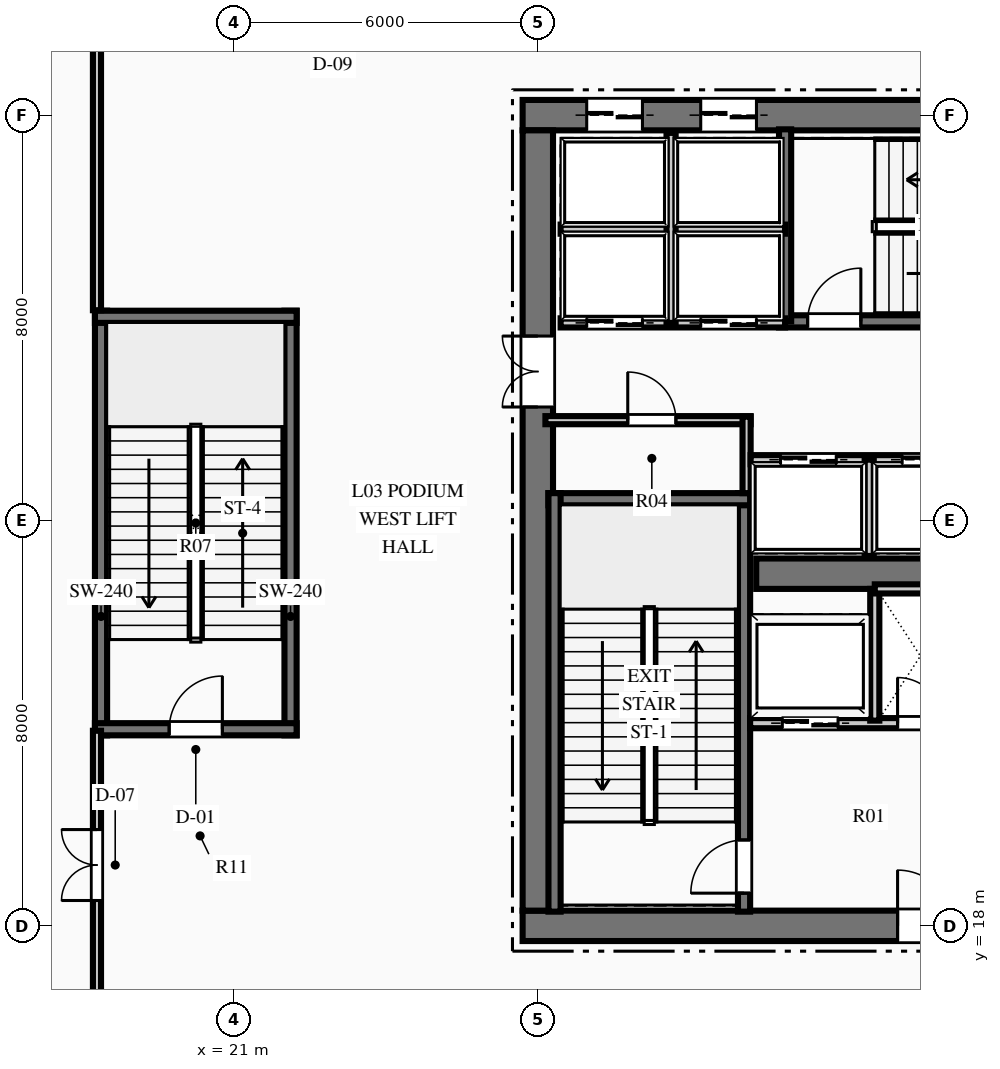
"""IFC4 building model, lengths in metres.
Left out: names, types, materials, properties, quantities, classifications, styles, units other than length and angle.
Written with IfcOpenShell. Run it as: python <this file> out.ifc"""

import sys

from ifc_helpers import new_model, si_unit, direction, frame, frame_2d, origin, place, context, subcontext, project, spatial, rectangle, extrude, element, fill, save


model = new_model("IFC4")
c1 = context("Model", 3, precision=1e-05, world=origin(), true_north=direction((0.0, 1.0)))
c2 = subcontext(c1, "Body", "Model", "MODEL_VIEW")
j1 = project(units=[si_unit("LENGTHUNIT", "METRE"), si_unit("PLANEANGLEUNIT", "RADIAN")], contexts=[c1])
p1 = place(None, origin())
s1 = spatial("IfcSite", under=j1, at=p1, CompositionType="ELEMENT")
p2 = place(p1, origin())
s2 = spatial("IfcBuilding", under=s1, at=p2, CompositionType="ELEMENT")
p3 = place(p2, frame((0.0, 0.0, 16.8)))
s3 = spatial("IfcBuildingStorey", under=s2, at=p3, CompositionType="ELEMENT", Elevation=16.8)
p4 = place(p3, frame((26.7, 18.0, 0.0), z_axis=(0.0, 0.0, 1.0), x_axis=(1.0, 0.0, 0.0)))
e1 = element("IfcWall", 1, at=p4, inside=s3, PredefinedType="SHEAR", context=c2, shape_type="SweptSolid", body=[
    extrude(rectangle(XDim=18.6, YDim=0.6, at=frame_2d((9.3, 0.0))), origin(), (0.0, 0.0, 1.0), 5.4),
])
p5 = place(p4, frame((7.4, 0.0, 0.0)))
e2 = element("IfcOpeningElement", 2, at=p5, cuts=e1, PredefinedType="OPENING", context=c2, shape_type="SweptSolid", body=[
    extrude(rectangle(XDim=1.1, YDim=2.15, at=frame_2d((0.55, 1.075))), frame((0.0, 0.31, 0.0), z_axis=(0.0, -1.0, 0.0), x_axis=(1.0, 0.0, 0.0)), (0.0, 0.0, 1.0), 0.62),
])
p6 = place(p4, frame((10.1, 0.0, 0.0)))
e3 = element("IfcOpeningElement", 3, at=p6, cuts=e1, PredefinedType="OPENING", context=c2, shape_type="SweptSolid", body=[
    extrude(rectangle(XDim=1.1, YDim=2.15, at=frame_2d((0.55, 1.075))), frame((0.0, 0.31, 0.0), z_axis=(0.0, -1.0, 0.0), x_axis=(1.0, 0.0, 0.0)), (0.0, 0.0, 1.0), 0.62),
])
p7 = place(p3, frame((26.7, 34.0, 0.0), z_axis=(0.0, 0.0, 1.0), x_axis=(1.0, 0.0, 0.0)))
e4 = element("IfcWall", 4, at=p7, inside=s3, PredefinedType="SHEAR", context=c2, shape_type="SweptSolid", body=[
    extrude(rectangle(XDim=18.6, YDim=0.6, at=frame_2d((9.3, 0.0))), origin(), (0.0, 0.0, 1.0), 5.4),
])
p8 = place(p7, frame((1.265, 0.0, 0.0)))
e5 = element("IfcOpeningElement", 5, at=p8, cuts=e4, PredefinedType="OPENING", context=c2, shape_type="SweptSolid", body=[
    extrude(rectangle(XDim=1.1, YDim=2.15, at=frame_2d((0.55, 1.075))), frame((0.0, 0.31, 0.0), z_axis=(0.0, -1.0, 0.0), x_axis=(1.0, 0.0, 0.0)), (0.0, 0.0, 1.0), 0.62),
])
p9 = place(p7, frame((3.515, 0.0, 0.0)))
e6 = element("IfcOpeningElement", 6, at=p9, cuts=e4, PredefinedType="OPENING", context=c2, shape_type="SweptSolid", body=[
    extrude(rectangle(XDim=1.1, YDim=2.15, at=frame_2d((0.55, 1.075))), frame((0.0, 0.31, 0.0), z_axis=(0.0, -1.0, 0.0), x_axis=(1.0, 0.0, 0.0)), (0.0, 0.0, 1.0), 0.62),
])
p10 = place(p7, frame((13.985, 0.0, 0.0)))
e7 = element("IfcOpeningElement", 7, at=p10, cuts=e4, PredefinedType="OPENING", context=c2, shape_type="SweptSolid", body=[
    extrude(rectangle(XDim=1.1, YDim=2.15, at=frame_2d((0.55, 1.075))), frame((0.0, 0.31, 0.0), z_axis=(0.0, -1.0, 0.0), x_axis=(1.0, 0.0, 0.0)), (0.0, 0.0, 1.0), 0.62),
])
p11 = place(p7, frame((16.235, 0.0, 0.0)))
e8 = element("IfcOpeningElement", 8, at=p11, cuts=e4, PredefinedType="OPENING", context=c2, shape_type="SweptSolid", body=[
    extrude(rectangle(XDim=1.1, YDim=2.15, at=frame_2d((0.55, 1.075))), frame((0.0, 0.31, 0.0), z_axis=(0.0, -1.0, 0.0), x_axis=(1.0, 0.0, 0.0)), (0.0, 0.0, 1.0), 0.62),
])
p12 = place(p3, frame((27.0, 18.3, 0.0), z_axis=(0.0, 0.0, 1.0), x_axis=(0.0, 1.0, 0.0)))
e9 = element("IfcWall", 9, at=p12, inside=s3, PredefinedType="SHEAR", context=c2, shape_type="SweptSolid", body=[
    extrude(rectangle(XDim=15.4, YDim=0.6, at=frame_2d((7.7, 0.0))), origin(), (0.0, 0.0, 1.0), 5.4),
])
p13 = place(p12, frame((9.94, 0.0, 0.0)))
e10 = element("IfcOpeningElement", 10, at=p13, cuts=e9, PredefinedType="OPENING", context=c2, shape_type="SweptSolid", body=[
    extrude(rectangle(XDim=1.4, YDim=2.2, at=frame_2d((0.7, 1.1))), frame((0.0, 0.31, 0.0), z_axis=(0.0, -1.0, 0.0), x_axis=(1.0, 0.0, 0.0)), (0.0, 0.0, 1.0), 0.62),
])
p14 = place(p3, frame((31.31, 24.95, 0.0), z_axis=(0.0, 0.0, 1.0), x_axis=(1.0, 0.0, 0.0)))
e11 = element("IfcWall", 11, at=p14, inside=s3, PredefinedType="SHEAR", context=c2, shape_type="SweptSolid", body=[
    extrude(rectangle(XDim=9.38, YDim=0.6, at=frame_2d((4.69, 0.0))), origin(), (0.0, 0.0, 1.0), 5.4),
])
p15 = place(p3, frame((31.07, 18.28, 0.0), z_axis=(0.0, 0.0, 1.0), x_axis=(0.0, 1.0, 0.0)))
e12 = element("IfcWall", 12, at=p15, inside=s3, PredefinedType="SHEAR", context=c2, shape_type="SweptSolid", body=[
    extrude(rectangle(XDim=8.26, YDim=0.24, at=frame_2d((4.13, 0.0))), origin(), (0.0, 0.0, 1.0), 5.4),
])
p16 = place(p15, frame((0.365, 0.0, 0.0)))
e13 = element("IfcOpeningElement", 13, at=p16, cuts=e12, PredefinedType="OPENING", context=c2, shape_type="SweptSolid", body=[
    extrude(rectangle(XDim=1.05, YDim=2.15, at=frame_2d((0.525, 1.075))), frame((0.0, 0.13, 0.0), z_axis=(0.0, -1.0, 0.0), x_axis=(1.0, 0.0, 0.0)), (0.0, 0.0, 1.0), 0.26),
])
p17 = place(p3, frame((27.21, 26.42, 0.0), z_axis=(0.0, 0.0, 1.0), x_axis=(1.0, 0.0, 0.0)))
e14 = element("IfcWall", 14, at=p17, inside=s3, PredefinedType="SHEAR", context=c2, shape_type="SweptSolid", body=[
    extrude(rectangle(XDim=3.98, YDim=0.24, at=frame_2d((1.99, 0.0))), origin(), (0.0, 0.0, 1.0), 5.4),
])
p18 = place(p3, frame((27.33, 18.28, 0.0), z_axis=(0.0, 0.0, 1.0), x_axis=(0.0, 1.0, 0.0)))
e15 = element("IfcWall", 15, at=p18, inside=s3, PredefinedType="SHEAR", context=c2, shape_type="SweptSolid", body=[
    extrude(rectangle(XDim=8.26, YDim=0.24, at=frame_2d((4.13, 0.0))), origin(), (0.0, 0.0, 1.0), 5.4),
])
p19 = place(p3, frame((31.76, 29.93, 0.0), z_axis=(0.0, 0.0, 1.0), x_axis=(1.0, 0.0, 0.0)))
e16 = element("IfcWall", 16, at=p19, inside=s3, PredefinedType="SHEAR", context=c2, shape_type="SweptSolid", body=[
    extrude(rectangle(XDim=8.38, YDim=0.24, at=frame_2d((4.19, 0.0))), origin(), (0.0, 0.0, 1.0), 5.4),
])
p20 = place(p19, frame((0.565, 0.0, 0.0)))
e17 = element("IfcOpeningElement", 17, at=p20, cuts=e16, PredefinedType="OPENING", context=c2, shape_type="SweptSolid", body=[
    extrude(rectangle(XDim=1.05, YDim=2.15, at=frame_2d((0.525, 1.075))), frame((0.0, 0.13, 0.0), z_axis=(0.0, -1.0, 0.0), x_axis=(1.0, 0.0, 0.0)), (0.0, 0.0, 1.0), 0.26),
])
p21 = place(p3, frame((31.88, 29.93, 0.0), z_axis=(0.0, 0.0, 1.0), x_axis=(0.0, 1.0, 0.0)))
e18 = element("IfcWall", 18, at=p21, inside=s3, PredefinedType="SHEAR", context=c2, shape_type="SweptSolid", body=[
    extrude(rectangle(XDim=3.79, YDim=0.24, at=frame_2d((1.895, 0.0))), origin(), (0.0, 0.0, 1.0), 5.4),
])
for number, where, z_axis, x_axis in (
    (19, (18.38, 21.76, 0.0), (0.0, 0.0, 1.0), (0.0, 1.0, 0.0)),
    (20, (22.12, 21.76, 0.0), (0.0, 0.0, 1.0), (0.0, 1.0, 0.0)),
):
    element("IfcWall", number, at=place(p3, frame(where, z_axis=z_axis, x_axis=x_axis)), inside=s3, PredefinedType="SHEAR", context=c2, shape_type="SweptSolid", body=[
        extrude(rectangle(XDim=8.38, YDim=0.24, at=frame_2d((4.19, 0.0))), origin(), (0.0, 0.0, 1.0), 5.4),
    ])
p22 = place(p3, frame((18.26, 21.88, 0.0), z_axis=(0.0, 0.0, 1.0), x_axis=(1.0, 0.0, 0.0)))
e21 = element("IfcWall", 21, at=p22, inside=s3, PredefinedType="SHEAR", context=c2, shape_type="SweptSolid", body=[
    extrude(rectangle(XDim=3.98, YDim=0.24, at=frame_2d((1.99, 0.0))), origin(), (0.0, 0.0, 1.0), 5.4),
])
p23 = place(p22, frame((1.465, 0.0, 0.0)))
e22 = element("IfcOpeningElement", 22, at=p23, cuts=e21, PredefinedType="OPENING", context=c2, shape_type="SweptSolid", body=[
    extrude(rectangle(XDim=1.05, YDim=2.15, at=frame_2d((0.525, 1.075))), frame((0.0, 0.13, 0.0), z_axis=(0.0, -1.0, 0.0), x_axis=(1.0, 0.0, 0.0)), (0.0, 0.0, 1.0), 0.26),
])
p24 = place(p3, frame((18.26, 30.02, 0.0), z_axis=(0.0, 0.0, 1.0), x_axis=(1.0, 0.0, 0.0)))
e23 = element("IfcWall", 23, at=p24, inside=s3, PredefinedType="SHEAR", context=c2, shape_type="SweptSolid", body=[
    extrude(rectangle(XDim=3.98, YDim=0.24, at=frame_2d((1.99, 0.0))), origin(), (0.0, 0.0, 1.0), 5.4),
])
p25 = place(p3, frame((31.19, 22.0, 0.0), z_axis=(0.0, 0.0, 1.0), x_axis=(1.0, 0.0, 0.0)))
e24 = element("IfcWall", 24, at=p25, inside=s3, PredefinedType="PARTITIONING", context=c2, shape_type="SweptSolid", body=[
    extrude(rectangle(XDim=4.69, YDim=0.2, at=frame_2d((2.345, 0.0))), origin(), (0.0, 0.0, 1.0), 4.98),
])
p26 = place(p25, frame((2.91, 0.0, 0.0)))
e25 = element("IfcOpeningElement", 25, at=p26, cuts=e24, PredefinedType="OPENING", context=c2, shape_type="SweptSolid", body=[
    extrude(rectangle(XDim=0.9, YDim=2.15, at=frame_2d((0.45, 1.075))), frame((0.0, 0.11, 0.0), z_axis=(0.0, -1.0, 0.0), x_axis=(1.0, 0.0, 0.0)), (0.0, 0.0, 1.0), 0.22),
])
p27 = place(p25, frame((0.635, 0.0, 0.0)))
e26 = element("IfcOpeningElement", 26, at=p27, cuts=e24, PredefinedType="OPENING", context=c2, shape_type="SweptSolid", body=[
    extrude(rectangle(XDim=1.1, YDim=2.15, at=frame_2d((0.55, 1.075))), frame((0.0, 0.11, 0.0), z_axis=(0.0, -1.0, 0.0), x_axis=(1.0, 0.0, 0.0)), (0.0, 0.0, 1.0), 0.22),
])
p28 = place(p3, frame((33.65, 22.05, 0.0), z_axis=(0.0, 0.0, 1.0), x_axis=(0.0, 1.0, 0.0)))
e27 = element("IfcWall", 27, at=p28, inside=s3, PredefinedType="PARTITIONING", context=c2, shape_type="SweptSolid", body=[
    extrude(rectangle(XDim=2.6, YDim=0.18, at=frame_2d((1.3, 0.0))), origin(), (0.0, 0.0, 1.0), 4.98),
])
p29 = place(p3, frame((33.65, 24.65, 0.0), z_axis=(0.0, 0.0, 1.0), x_axis=(1.0, 0.0, 0.0)))
e28 = element("IfcWall", 28, at=p29, inside=s3, PredefinedType="PARTITIONING", context=c2, shape_type="SweptSolid", body=[
    extrude(rectangle(XDim=1.8, YDim=0.18, at=frame_2d((0.9, 0.0))), origin(), (0.0, 0.0, 1.0), 4.98),
])
p30 = place(p3, frame((27.15, 27.98, 0.0), z_axis=(0.0, 0.0, 1.0), x_axis=(1.0, 0.0, 0.0)))
e29 = element("IfcWall", 29, at=p30, inside=s3, PredefinedType="PARTITIONING", context=c2, shape_type="SweptSolid", body=[
    extrude(rectangle(XDim=4.05, YDim=0.16, at=frame_2d((2.025, 0.0))), origin(), (0.0, 0.0, 1.0), 4.98),
])
p31 = place(p30, frame((1.625, 0.0, 0.0)))
e30 = element("IfcOpeningElement", 30, at=p31, cuts=e29, PredefinedType="OPENING", context=c2, shape_type="SweptSolid", body=[
    extrude(rectangle(XDim=0.95, YDim=2.15, at=frame_2d((0.475, 1.075))), frame((0.0, 0.09, 0.0), z_axis=(0.0, -1.0, 0.0), x_axis=(1.0, 0.0, 0.0)), (0.0, 0.0, 1.0), 0.18),
])
p32 = place(p3, frame((31.12, 26.54, 0.0), z_axis=(0.0, 0.0, 1.0), x_axis=(0.0, 1.0, 0.0)))
e31 = element("IfcWall", 31, at=p32, inside=s3, PredefinedType="PARTITIONING", context=c2, shape_type="SweptSolid", body=[
    extrude(rectangle(XDim=1.51, YDim=0.16, at=frame_2d((0.755, 0.0))), origin(), (0.0, 0.0, 1.0), 4.98),
])
p33 = place(p3, frame((27.45, 29.9, 0.0), z_axis=(0.0, 0.0, 1.0), x_axis=(1.0, 0.0, 0.0)))
e32 = element("IfcWall", 32, at=p33, inside=s3, PredefinedType="PARTITIONING", context=c2, shape_type="SweptSolid", body=[
    extrude(rectangle(XDim=4.43, YDim=0.18, at=frame_2d((2.215, 0.0))), origin(), (0.0, 0.0, 1.0), 4.98),
])
p34 = place(p33, frame((0.515, 0.0, 0.0)))
e33 = element("IfcOpeningElement", 33, at=p34, cuts=e32, PredefinedType="OPENING", context=c2, shape_type="SweptSolid", body=[
    extrude(rectangle(XDim=1.1, YDim=2.15, at=frame_2d((0.55, 1.075))), frame((0.0, 0.1, 0.0), z_axis=(0.0, -1.0, 0.0), x_axis=(1.0, 0.0, 0.0)), (0.0, 0.0, 1.0), 0.2),
])
p35 = place(p33, frame((2.765, 0.0, 0.0)))
e34 = element("IfcOpeningElement", 34, at=p35, cuts=e32, PredefinedType="OPENING", context=c2, shape_type="SweptSolid", body=[
    extrude(rectangle(XDim=1.1, YDim=2.15, at=frame_2d((0.55, 1.075))), frame((0.0, 0.1, 0.0), z_axis=(0.0, -1.0, 0.0), x_axis=(1.0, 0.0, 0.0)), (0.0, 0.0, 1.0), 0.2),
])
p36 = place(p3, frame((27.45, 31.75, 0.0), z_axis=(0.0, 0.0, 1.0), x_axis=(1.0, 0.0, 0.0)))
e35 = element("IfcWall", 35, at=p36, inside=s3, PredefinedType="PARTITIONING", context=c2, shape_type="SweptSolid", body=[
    extrude(rectangle(XDim=4.43, YDim=0.18, at=frame_2d((2.215, 0.0))), origin(), (0.0, 0.0, 1.0), 4.98),
])
p37 = place(p3, frame((29.63, 29.9, 0.0), z_axis=(0.0, 0.0, 1.0), x_axis=(0.0, 1.0, 0.0)))
e36 = element("IfcWall", 36, at=p37, inside=s3, PredefinedType="PARTITIONING", context=c2, shape_type="SweptSolid", body=[
    extrude(rectangle(XDim=3.75, YDim=0.18, at=frame_2d((1.875, 0.0))), origin(), (0.0, 0.0, 1.0), 4.98),
])
p38 = place(p3, frame((31.2, 27.2, 0.0), z_axis=(0.0, 0.0, 1.0), x_axis=(1.0, 0.0, 0.0)))
e37 = element("IfcWall", 37, at=p38, inside=s3, PredefinedType="PARTITIONING", context=c2, shape_type="SweptSolid", body=[
    extrude(rectangle(XDim=9.6, YDim=0.18, at=frame_2d((4.8, 0.0))), origin(), (0.0, 0.0, 1.0), 4.98),
])
p39 = place(p38, frame((0.59, 0.0, 0.0)))
e38 = element("IfcOpeningElement", 38, at=p39, cuts=e37, PredefinedType="OPENING", context=c2, shape_type="SweptSolid", body=[
    extrude(rectangle(XDim=1.1, YDim=2.15, at=frame_2d((0.55, 1.075))), frame((0.0, 0.1, 0.0), z_axis=(0.0, -1.0, 0.0), x_axis=(1.0, 0.0, 0.0)), (0.0, 0.0, 1.0), 0.2),
])
p40 = place(p38, frame((2.99, 0.0, 0.0)))
e39 = element("IfcOpeningElement", 39, at=p40, cuts=e37, PredefinedType="OPENING", context=c2, shape_type="SweptSolid", body=[
    extrude(rectangle(XDim=1.1, YDim=2.15, at=frame_2d((0.55, 1.075))), frame((0.0, 0.1, 0.0), z_axis=(0.0, -1.0, 0.0), x_axis=(1.0, 0.0, 0.0)), (0.0, 0.0, 1.0), 0.2),
])
p41 = place(p38, frame((5.51, 0.0, 0.0)))
e40 = element("IfcOpeningElement", 40, at=p41, cuts=e37, PredefinedType="OPENING", context=c2, shape_type="SweptSolid", body=[
    extrude(rectangle(XDim=1.1, YDim=2.15, at=frame_2d((0.55, 1.075))), frame((0.0, 0.1, 0.0), z_axis=(0.0, -1.0, 0.0), x_axis=(1.0, 0.0, 0.0)), (0.0, 0.0, 1.0), 0.2),
])
p42 = place(p38, frame((7.91, 0.0, 0.0)))
e41 = element("IfcOpeningElement", 41, at=p42, cuts=e37, PredefinedType="OPENING", context=c2, shape_type="SweptSolid", body=[
    extrude(rectangle(XDim=1.1, YDim=2.15, at=frame_2d((0.55, 1.075))), frame((0.0, 0.1, 0.0), z_axis=(0.0, -1.0, 0.0), x_axis=(1.0, 0.0, 0.0)), (0.0, 0.0, 1.0), 0.2),
])
p43 = place(p3, frame((33.54, 25.3, 0.0), z_axis=(0.0, 0.0, 1.0), x_axis=(0.0, 1.0, 0.0)))
e42 = element("IfcWall", 42, at=p43, inside=s3, PredefinedType="PARTITIONING", context=c2, shape_type="SweptSolid", body=[
    extrude(rectangle(XDim=1.9, YDim=0.18, at=frame_2d((0.95, 0.0))), origin(), (0.0, 0.0, 1.0), 4.98),
])
p44 = place(p3, frame((18.3, 15.3, 0.0), z_axis=(0.0, 0.0, 1.0), x_axis=(0.0, 1.0, 0.0)))
e43 = element("IfcWall", 43, at=p44, inside=s3, PredefinedType="PARTITIONING", context=c2, shape_type="SweptSolid", body=[
    extrude(rectangle(XDim=6.55, YDim=0.16, at=frame_2d((3.275, 0.0))), origin(), (0.0, 0.0, 1.0), 4.98),
])
p45 = place(p44, frame((3.2, 0.0, 0.0)))
e44 = element("IfcOpeningElement", 44, at=p45, cuts=e43, PredefinedType="OPENING", context=c2, shape_type="SweptSolid", body=[
    extrude(rectangle(XDim=1.4, YDim=2.2, at=frame_2d((0.7, 1.1))), frame((0.0, 0.09, 0.0), z_axis=(0.0, -1.0, 0.0), x_axis=(1.0, 0.0, 0.0)), (0.0, 0.0, 1.0), 0.18),
])
p46 = place(p3, frame((18.3, 30.15, 0.0), z_axis=(0.0, 0.0, 1.0), x_axis=(0.0, 1.0, 0.0)))
e45 = element("IfcWall", 45, at=p46, inside=s3, PredefinedType="PARTITIONING", context=c2, shape_type="SweptSolid", body=[
    extrude(rectangle(XDim=6.55, YDim=0.16, at=frame_2d((3.275, 0.0))), origin(), (0.0, 0.0, 1.0), 4.98),
])
p47 = place(p31, origin())
e46 = element("IfcDoor", 46, at=p47, inside=s3, OperationType="SINGLE_SWING_LEFT", PredefinedType="DOOR", context=c2, shape_type="SweptSolid", body=[
    extrude(rectangle(XDim=0.95, YDim=2.15, at=frame_2d((0.475, 1.075))), frame((0.0, 0.025, 0.0), z_axis=(0.0, -1.0, 0.0), x_axis=(1.0, 0.0, 0.0)), (0.0, 0.0, 1.0), 0.05),
])
fill(e30, e46)
p48 = place(p16, origin())
e47 = element("IfcDoor", 47, at=p48, inside=s3, OperationType="SINGLE_SWING_LEFT", PredefinedType="DOOR", context=c2, shape_type="SweptSolid", body=[
    extrude(rectangle(XDim=1.05, YDim=2.15, at=frame_2d((0.525, 1.075))), frame((0.0, 0.025, 0.0), z_axis=(0.0, -1.0, 0.0), x_axis=(1.0, 0.0, 0.0)), (0.0, 0.0, 1.0), 0.05),
])
fill(e13, e47)
p49 = place(p20, origin())
e48 = element("IfcDoor", 48, at=p49, inside=s3, OperationType="SINGLE_SWING_RIGHT", PredefinedType="DOOR", context=c2, shape_type="SweptSolid", body=[
    extrude(rectangle(XDim=1.05, YDim=2.15, at=frame_2d((0.525, 1.075))), frame((0.0, 0.025, 0.0), z_axis=(0.0, -1.0, 0.0), x_axis=(1.0, 0.0, 0.0)), (0.0, 0.0, 1.0), 0.05),
])
fill(e17, e48)
p50 = place(p5, origin())
e49 = element("IfcDoor", 49, at=p50, inside=s3, OperationType="SINGLE_SWING_LEFT", PredefinedType="DOOR", context=c2, shape_type="SweptSolid", body=[
    extrude(rectangle(XDim=1.1, YDim=2.15, at=frame_2d((0.55, 1.075))), frame((0.0, 0.025, 0.0), z_axis=(0.0, -1.0, 0.0), x_axis=(1.0, 0.0, 0.0)), (0.0, 0.0, 1.0), 0.05),
])
fill(e2, e49)
p51 = place(p26, origin())
e50 = element("IfcDoor", 50, at=p51, inside=s3, OperationType="SINGLE_SWING_LEFT", PredefinedType="DOOR", context=c2, shape_type="SweptSolid", body=[
    extrude(rectangle(XDim=0.9, YDim=2.15, at=frame_2d((0.45, 1.075))), frame((0.0, 0.025, 0.0), z_axis=(0.0, -1.0, 0.0), x_axis=(1.0, 0.0, 0.0)), (0.0, 0.0, 1.0), 0.05),
])
fill(e25, e50)
p52 = place(p13, origin())
e51 = element("IfcDoor", 51, at=p52, inside=s3, OperationType="DOUBLE_DOOR_SINGLE_SWING", PredefinedType="DOOR", context=c2, shape_type="SweptSolid", body=[
    extrude(rectangle(XDim=1.4, YDim=2.2, at=frame_2d((0.7, 1.1))), frame((0.0, 0.025, 0.0), z_axis=(0.0, -1.0, 0.0), x_axis=(1.0, 0.0, 0.0)), (0.0, 0.0, 1.0), 0.05),
])
fill(e10, e51)
p53 = place(p23, origin())
e52 = element("IfcDoor", 52, at=p53, inside=s3, OperationType="SINGLE_SWING_RIGHT", PredefinedType="DOOR", context=c2, shape_type="SweptSolid", body=[
    extrude(rectangle(XDim=1.05, YDim=2.15, at=frame_2d((0.525, 1.075))), frame((0.0, 0.025, 0.0), z_axis=(0.0, -1.0, 0.0), x_axis=(1.0, 0.0, 0.0)), (0.0, 0.0, 1.0), 0.05),
])
fill(e22, e52)
p54 = place(p45, origin())
e53 = element("IfcDoor", 53, at=p54, inside=s3, OperationType="DOUBLE_DOOR_SINGLE_SWING", PredefinedType="DOOR", context=c2, shape_type="SweptSolid", body=[
    extrude(rectangle(XDim=1.4, YDim=2.2, at=frame_2d((0.7, 1.1))), frame((0.0, 0.025, 0.0), z_axis=(0.0, -1.0, 0.0), x_axis=(1.0, 0.0, 0.0)), (0.0, 0.0, 1.0), 0.05),
])
fill(e44, e53)
p55 = place(p34, origin())
e54 = element("IfcDoor", 54, at=p55, inside=s3, OperationType="SLIDING_TO_LEFT", PredefinedType="DOOR", context=c2, shape_type="SweptSolid", body=[
    extrude(rectangle(XDim=1.1, YDim=2.15, at=frame_2d((0.55, 1.075))), frame((0.0, 0.025, 0.0), z_axis=(0.0, -1.0, 0.0), x_axis=(1.0, 0.0, 0.0)), (0.0, 0.0, 1.0), 0.05),
])
fill(e33, e54)
p56 = place(p35, origin())
e55 = element("IfcDoor", 55, at=p56, inside=s3, OperationType="SLIDING_TO_LEFT", PredefinedType="DOOR", context=c2, shape_type="SweptSolid", body=[
    extrude(rectangle(XDim=1.1, YDim=2.15, at=frame_2d((0.55, 1.075))), frame((0.0, 0.025, 0.0), z_axis=(0.0, -1.0, 0.0), x_axis=(1.0, 0.0, 0.0)), (0.0, 0.0, 1.0), 0.05),
])
fill(e34, e55)
p57 = place(p8, origin())
e56 = element("IfcDoor", 56, at=p57, inside=s3, OperationType="SLIDING_TO_LEFT", PredefinedType="DOOR", context=c2, shape_type="SweptSolid", body=[
    extrude(rectangle(XDim=1.1, YDim=2.15, at=frame_2d((0.55, 1.075))), frame((0.0, 0.025, 0.0), z_axis=(0.0, -1.0, 0.0), x_axis=(1.0, 0.0, 0.0)), (0.0, 0.0, 1.0), 0.05),
])
fill(e5, e56)
p58 = place(p9, origin())
e57 = element("IfcDoor", 57, at=p58, inside=s3, OperationType="SLIDING_TO_LEFT", PredefinedType="DOOR", context=c2, shape_type="SweptSolid", body=[
    extrude(rectangle(XDim=1.1, YDim=2.15, at=frame_2d((0.55, 1.075))), frame((0.0, 0.025, 0.0), z_axis=(0.0, -1.0, 0.0), x_axis=(1.0, 0.0, 0.0)), (0.0, 0.0, 1.0), 0.05),
])
fill(e6, e57)
p59 = place(p39, origin())
e58 = element("IfcDoor", 58, at=p59, inside=s3, OperationType="SLIDING_TO_LEFT", PredefinedType="DOOR", context=c2, shape_type="SweptSolid", body=[
    extrude(rectangle(XDim=1.1, YDim=2.15, at=frame_2d((0.55, 1.075))), frame((0.0, 0.025, 0.0), z_axis=(0.0, -1.0, 0.0), x_axis=(1.0, 0.0, 0.0)), (0.0, 0.0, 1.0), 0.05),
])
fill(e38, e58)
p60 = place(p40, origin())
e59 = element("IfcDoor", 59, at=p60, inside=s3, OperationType="SLIDING_TO_LEFT", PredefinedType="DOOR", context=c2, shape_type="SweptSolid", body=[
    extrude(rectangle(XDim=1.1, YDim=2.15, at=frame_2d((0.55, 1.075))), frame((0.0, 0.025, 0.0), z_axis=(0.0, -1.0, 0.0), x_axis=(1.0, 0.0, 0.0)), (0.0, 0.0, 1.0), 0.05),
])
fill(e39, e59)
p61 = place(p27, origin())
e60 = element("IfcDoor", 60, at=p61, inside=s3, OperationType="SLIDING_TO_LEFT", PredefinedType="DOOR", context=c2, shape_type="SweptSolid", body=[
    extrude(rectangle(XDim=1.1, YDim=2.15, at=frame_2d((0.55, 1.075))), frame((0.0, 0.025, 0.0), z_axis=(0.0, -1.0, 0.0), x_axis=(1.0, 0.0, 0.0)), (0.0, 0.0, 1.0), 0.05),
])
fill(e26, e60)
save(model, sys.argv[1])
